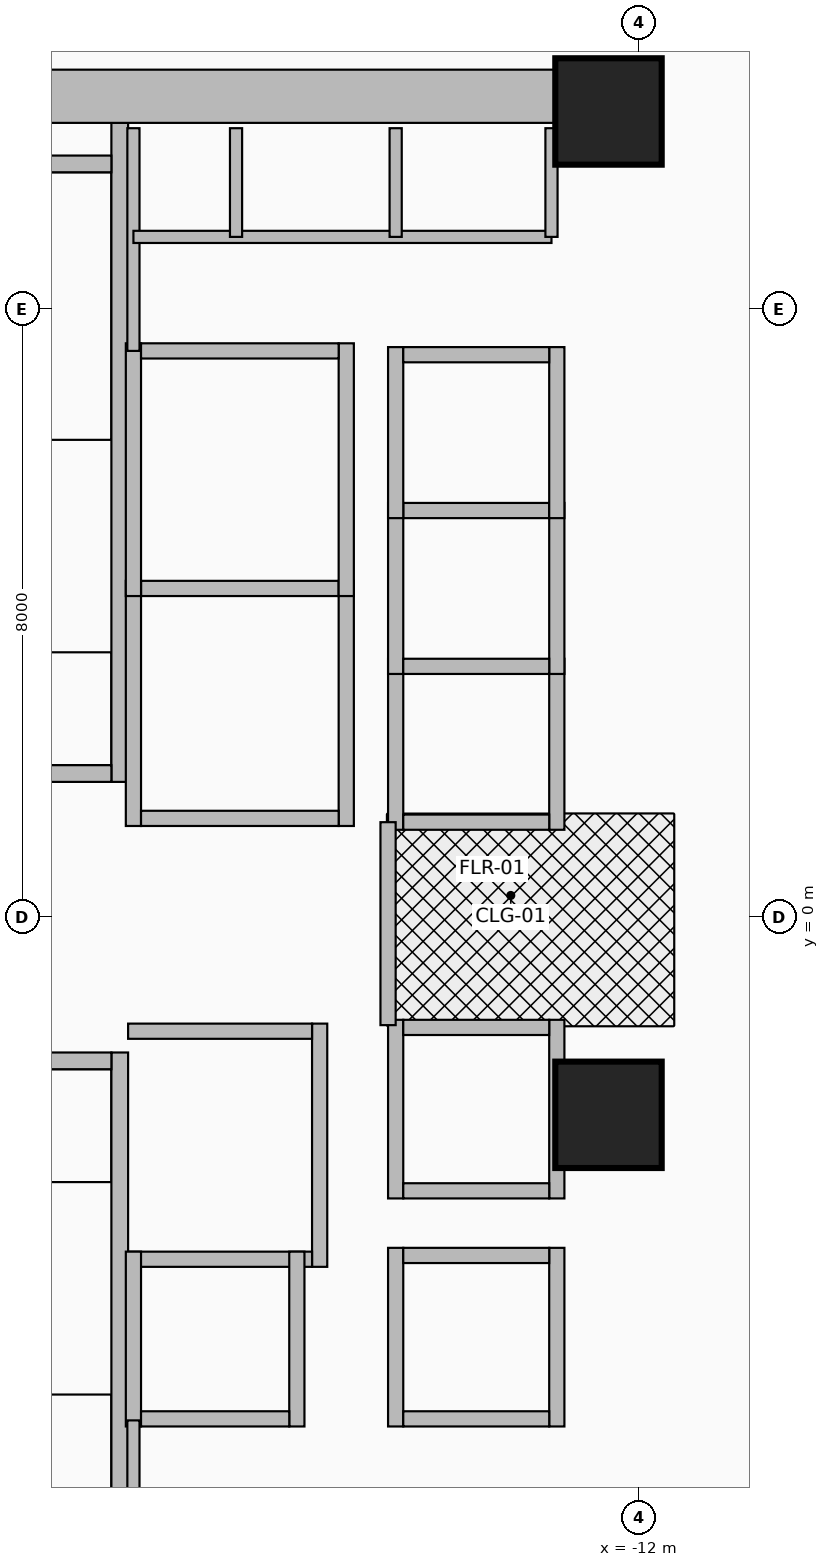
"""IFC4 building model, lengths in metres.
Left out: names, types, materials, properties, quantities, classifications, styles, units other than length and angle.
Written with IfcOpenShell. Run it as: python <this file> out.ifc"""

import sys

from ifc_helpers import new_model, si_unit, direction, frame, frame_2d, origin, origin_2d, place, context, subcontext, project, spatial, rectangle, extrude, source, transform, mapped, element, fill, save


model = new_model("IFC4")
c1 = context("Model", 3, precision=1e-05, world=origin(), true_north=direction((0.0, 1.0)))
c2 = subcontext(c1, "Body", "Model", "MODEL_VIEW")
j1 = project(units=[si_unit("LENGTHUNIT", "METRE"), si_unit("PLANEANGLEUNIT", "RADIAN")], contexts=[c1])
p1 = place(None, origin())
s1 = spatial("IfcSite", under=j1, at=p1, CompositionType="ELEMENT")
p2 = place(p1, origin())
s2 = spatial("IfcBuilding", under=s1, at=p2, CompositionType="ELEMENT")
p3 = place(p2, frame((0.0, 0.0, 70.4)))
s3 = spatial("IfcBuildingStorey", under=s2, at=p3, CompositionType="ELEMENT", Elevation=70.4)
p4 = place(p3, frame((-18.83, 1.78, 0.0), z_axis=(0.0, 0.0, 1.0), x_axis=(0.0, 1.0, 0.0)))
e1 = element("IfcWall", 1, at=p4, inside=s3, PredefinedType="SHEAR", context=c2, shape_type="SweptSolid", body=[
    extrude(rectangle(XDim=8.67, YDim=0.22, at=frame_2d((4.335, 0.0))), origin(), (0.0, 0.0, 1.0), 3.46),
])
p5 = place(p3, frame((-22.05, 1.89, 0.0), z_axis=(0.0, 0.0, 1.0), x_axis=(1.0, 0.0, 0.0)))
e2 = element("IfcWall", 2, at=p5, inside=s3, PredefinedType="SHEAR", context=c2, shape_type="SweptSolid", body=[
    extrude(rectangle(XDim=3.11, YDim=0.22, at=frame_2d((1.555, 0.0))), origin(), (0.0, 0.0, 1.0), 3.46),
])
p6 = place(p5, frame((1.0, 0.0, 0.0)))
e3 = element("IfcOpeningElement", 3, at=p6, cuts=e2, PredefinedType="OPENING", context=c2, shape_type="SweptSolid", body=[
    extrude(rectangle(XDim=1.1, YDim=2.15, at=frame_2d((0.55, 1.075))), frame((0.0, 0.125, 0.0), z_axis=(0.0, -1.0, 0.0), x_axis=(1.0, 0.0, 0.0)), (0.0, 0.0, 1.0), 0.25),
])
p7 = place(p3, frame((-22.05, 9.91, 0.0), z_axis=(0.0, 0.0, 1.0), x_axis=(1.0, 0.0, 0.0)))
e4 = element("IfcWall", 4, at=p7, inside=s3, PredefinedType="SHEAR", context=c2, shape_type="SweptSolid", body=[
    extrude(rectangle(XDim=3.11, YDim=0.22, at=frame_2d((1.555, 0.0))), origin(), (0.0, 0.0, 1.0), 3.46),
])
p8 = place(p3, frame((-18.83, -10.45, 0.0), z_axis=(0.0, 0.0, 1.0), x_axis=(0.0, 1.0, 0.0)))
e5 = element("IfcWall", 5, at=p8, inside=s3, PredefinedType="SHEAR", context=c2, shape_type="SweptSolid", body=[
    extrude(rectangle(XDim=8.67, YDim=0.22, at=frame_2d((4.335, 0.0))), origin(), (0.0, 0.0, 1.0), 3.46),
])
p9 = place(p3, frame((-22.05, -1.89, 0.0), z_axis=(0.0, 0.0, 1.0), x_axis=(1.0, 0.0, 0.0)))
e6 = element("IfcWall", 6, at=p9, inside=s3, PredefinedType="SHEAR", context=c2, shape_type="SweptSolid", body=[
    extrude(rectangle(XDim=3.11, YDim=0.22, at=frame_2d((1.555, 0.0))), origin(), (0.0, 0.0, 1.0), 3.46),
])
p10 = place(p9, frame((1.0, 0.0, 0.0)))
e7 = element("IfcOpeningElement", 7, at=p10, cuts=e6, PredefinedType="OPENING", context=c2, shape_type="SweptSolid", body=[
    extrude(rectangle(XDim=1.1, YDim=2.15, at=frame_2d((0.55, 1.075))), frame((0.0, 0.125, 0.0), z_axis=(0.0, -1.0, 0.0), x_axis=(1.0, 0.0, 0.0)), (0.0, 0.0, 1.0), 0.25),
])
p11 = place(p3, frame((-22.65, 10.8, 0.0), z_axis=(0.0, 0.0, 1.0), x_axis=(1.0, 0.0, 0.0)))
e8 = element("IfcWall", 8, at=p11, inside=s3, PredefinedType="SHEAR", context=c2, shape_type="SweptSolid", body=[
    extrude(rectangle(XDim=10.25, YDim=0.7, at=frame_2d((5.125, 0.0))), origin(), (0.0, 0.0, 1.0), 3.46),
])
m1 = source(origin(), c2, "Body", "SweptSolid", [
    extrude(rectangle(XDim=1.4, YDim=1.4, at=origin_2d()), origin(), (0.0, 0.0, 1.0), 3.7),
])
for number, where, z_axis, x_axis in (
    (9, (-12.4, -2.6, 0.0), (0.0, 0.0, 1.0), (1.0, 0.0, 0.0)),
    (10, (-12.4, 10.6, 0.0), (0.0, 0.0, 1.0), (1.0, 0.0, 0.0)),
):
    element("IfcColumn", number, at=place(p3, frame(where, z_axis=z_axis, x_axis=x_axis)), inside=s3, PredefinedType="COLUMN", context=c2, shape_type="MappedRepresentation", body=[
        mapped(m1, transform((0.0, 0.0, 0.0), x_axis=(1.0, 0.0, 0.0), y_axis=(0.0, 1.0, 0.0), z_axis=(0.0, 0.0, 1.0), scale=1.0)),
    ])
for number, where, z_axis, x_axis in (
    (11, (-18.65, 1.2, 0.0), (0.0, 0.0, 1.0), (0.0, 1.0, 0.0)),
    (12, (-15.85, 1.2, 0.0), (0.0, 0.0, 1.0), (0.0, 1.0, 0.0)),
):
    element("IfcWall", number, at=place(p3, frame(where, z_axis=z_axis, x_axis=x_axis)), inside=s3, PredefinedType="MOVABLE", context=c2, shape_type="SweptSolid", body=[
        extrude(rectangle(XDim=3.225, YDim=0.2, at=frame_2d((1.613, 0.0))), origin(), (0.0, 0.0, 1.0), 3.46),
    ])
p12 = place(p3, frame((-18.55, 1.3, 0.0), z_axis=(0.0, 0.0, 1.0), x_axis=(1.0, 0.0, 0.0)))
e13 = element("IfcWall", 13, at=p12, inside=s3, PredefinedType="MOVABLE", context=c2, shape_type="SweptSolid", body=[
    extrude(rectangle(XDim=2.6, YDim=0.2, at=frame_2d((1.3, 0.0))), origin(), (0.0, 0.0, 1.0), 3.46),
])
p13 = place(p12, frame((0.7, 0.0, 0.0)))
e14 = element("IfcOpeningElement", 14, at=p13, cuts=e13, PredefinedType="OPENING", context=c2, shape_type="SweptSolid", body=[
    extrude(rectangle(XDim=1.2, YDim=2.1, at=frame_2d((0.6, 1.05))), frame((0.0, 0.115, 0.0), z_axis=(0.0, -1.0, 0.0), x_axis=(1.0, 0.0, 0.0)), (0.0, 0.0, 1.0), 0.23),
])
p14 = place(p3, frame((-18.55, 4.325, 0.0), z_axis=(0.0, 0.0, 1.0), x_axis=(1.0, 0.0, 0.0)))
e15 = element("IfcWall", 15, at=p14, inside=s3, PredefinedType="MOVABLE", context=c2, shape_type="SweptSolid", body=[
    extrude(rectangle(XDim=2.6, YDim=0.2, at=frame_2d((1.3, 0.0))), origin(), (0.0, 0.0, 1.0), 3.46),
])
p15 = place(p3, frame((-16.2, -4.6, 0.0), z_axis=(0.0, 0.0, 1.0), x_axis=(0.0, 1.0, 0.0)))
e16 = element("IfcWall", 16, at=p15, inside=s3, PredefinedType="MOVABLE", context=c2, shape_type="SweptSolid", body=[
    extrude(rectangle(XDim=3.2, YDim=0.2, at=frame_2d((1.6, 0.0))), origin(), (0.0, 0.0, 1.0), 3.46),
])
p16 = place(p3, frame((-18.72, -4.5, 0.0), z_axis=(0.0, 0.0, 1.0), x_axis=(1.0, 0.0, 0.0)))
e17 = element("IfcWall", 17, at=p16, inside=s3, PredefinedType="MOVABLE", context=c2, shape_type="SweptSolid", body=[
    extrude(rectangle(XDim=2.42, YDim=0.2, at=frame_2d((1.21, 0.0))), origin(), (0.0, 0.0, 1.0), 3.46),
])
p17 = place(p3, frame((-18.72, -1.5, 0.0), z_axis=(0.0, 0.0, 1.0), x_axis=(1.0, 0.0, 0.0)))
e18 = element("IfcWall", 18, at=p17, inside=s3, PredefinedType="MOVABLE", context=c2, shape_type="SweptSolid", body=[
    extrude(rectangle(XDim=2.42, YDim=0.2, at=frame_2d((1.21, 0.0))), origin(), (0.0, 0.0, 1.0), 3.46),
])
p18 = place(p17, frame((0.61, 0.0, 0.0)))
e19 = element("IfcOpeningElement", 19, at=p18, cuts=e18, PredefinedType="OPENING", context=c2, shape_type="SweptSolid", body=[
    extrude(rectangle(XDim=1.2, YDim=2.1, at=frame_2d((0.6, 1.05))), frame((0.0, 0.115, 0.0), z_axis=(0.0, -1.0, 0.0), x_axis=(1.0, 0.0, 0.0)), (0.0, 0.0, 1.0), 0.23),
])
for number, where, z_axis, x_axis in (
    (20, (-18.65, 4.225, 0.0), (0.0, 0.0, 1.0), (0.0, 1.0, 0.0)),
    (21, (-15.85, 4.225, 0.0), (0.0, 0.0, 1.0), (0.0, 1.0, 0.0)),
):
    element("IfcWall", number, at=place(p3, frame(where, z_axis=z_axis, x_axis=x_axis)), inside=s3, PredefinedType="MOVABLE", context=c2, shape_type="SweptSolid", body=[
        extrude(rectangle(XDim=3.325, YDim=0.2, at=frame_2d((1.663, 0.0))), origin(), (0.0, 0.0, 1.0), 3.46),
    ])
p19 = place(p3, frame((-18.55, 7.45, 0.0), z_axis=(0.0, 0.0, 1.0), x_axis=(1.0, 0.0, 0.0)))
e22 = element("IfcWall", 22, at=p19, inside=s3, PredefinedType="MOVABLE", context=c2, shape_type="SweptSolid", body=[
    extrude(rectangle(XDim=2.6, YDim=0.2, at=frame_2d((1.3, 0.0))), origin(), (0.0, 0.0, 1.0), 3.46),
])
p20 = place(p19, frame((0.7, 0.0, 0.0)))
e23 = element("IfcOpeningElement", 23, at=p20, cuts=e22, PredefinedType="OPENING", context=c2, shape_type="SweptSolid", body=[
    extrude(rectangle(XDim=1.2, YDim=2.1, at=frame_2d((0.6, 1.05))), frame((0.0, 0.115, 0.0), z_axis=(0.0, -1.0, 0.0), x_axis=(1.0, 0.0, 0.0)), (0.0, 0.0, 1.0), 0.23),
])
for number, where, z_axis, x_axis in (
    (24, (-15.2, -6.7, 0.0), (0.0, 0.0, 1.0), (0.0, 1.0, 0.0)),
    (25, (-13.08, -6.7, 0.0), (0.0, 0.0, 1.0), (0.0, 1.0, 0.0)),
):
    element("IfcWall", number, at=place(p3, frame(where, z_axis=z_axis, x_axis=x_axis)), inside=s3, PredefinedType="MOVABLE", context=c2, shape_type="SweptSolid", body=[
        extrude(rectangle(XDim=2.35, YDim=0.2, at=frame_2d((1.175, 0.0))), origin(), (0.0, 0.0, 1.0), 3.46),
    ])
p21 = place(p3, frame((-15.1, -6.6, 0.0), z_axis=(0.0, 0.0, 1.0), x_axis=(1.0, 0.0, 0.0)))
e26 = element("IfcWall", 26, at=p21, inside=s3, PredefinedType="MOVABLE", context=c2, shape_type="SweptSolid", body=[
    extrude(rectangle(XDim=1.92, YDim=0.2, at=frame_2d((0.96, 0.0))), origin(), (0.0, 0.0, 1.0), 3.46),
])
p22 = place(p21, frame((0.41, 0.0, 0.0)))
e27 = element("IfcOpeningElement", 27, at=p22, cuts=e26, PredefinedType="OPENING", context=c2, shape_type="SweptSolid", body=[
    extrude(rectangle(XDim=1.1, YDim=2.1, at=frame_2d((0.55, 1.05))), frame((0.0, 0.115, 0.0), z_axis=(0.0, -1.0, 0.0), x_axis=(1.0, 0.0, 0.0)), (0.0, 0.0, 1.0), 0.23),
])
p23 = place(p3, frame((-15.1, -4.45, 0.0), z_axis=(0.0, 0.0, 1.0), x_axis=(1.0, 0.0, 0.0)))
e28 = element("IfcWall", 28, at=p23, inside=s3, PredefinedType="MOVABLE", context=c2, shape_type="SweptSolid", body=[
    extrude(rectangle(XDim=1.92, YDim=0.2, at=frame_2d((0.96, 0.0))), origin(), (0.0, 0.0, 1.0), 3.46),
])
for number, where, z_axis, x_axis in (
    (29, (-15.2, 1.15, 0.0), (0.0, 0.0, 1.0), (0.0, 1.0, 0.0)),
    (30, (-13.08, 1.15, 0.0), (0.0, 0.0, 1.0), (0.0, 1.0, 0.0)),
):
    element("IfcWall", number, at=place(p3, frame(where, z_axis=z_axis, x_axis=x_axis)), inside=s3, PredefinedType="MOVABLE", context=c2, shape_type="SweptSolid", body=[
        extrude(rectangle(XDim=2.25, YDim=0.2, at=frame_2d((1.125, 0.0))), origin(), (0.0, 0.0, 1.0), 3.46),
    ])
p24 = place(p3, frame((-15.1, 1.25, 0.0), z_axis=(0.0, 0.0, 1.0), x_axis=(1.0, 0.0, 0.0)))
e31 = element("IfcWall", 31, at=p24, inside=s3, PredefinedType="MOVABLE", context=c2, shape_type="SweptSolid", body=[
    extrude(rectangle(XDim=1.92, YDim=0.2, at=frame_2d((0.96, 0.0))), origin(), (0.0, 0.0, 1.0), 3.46),
])
for number, where, z_axis, x_axis in (
    (32, (-15.2, 3.2, 0.0), (0.0, 0.0, 1.0), (0.0, 1.0, 0.0)),
    (33, (-13.08, 3.2, 0.0), (0.0, 0.0, 1.0), (0.0, 1.0, 0.0)),
):
    element("IfcWall", number, at=place(p3, frame(where, z_axis=z_axis, x_axis=x_axis)), inside=s3, PredefinedType="MOVABLE", context=c2, shape_type="SweptSolid", body=[
        extrude(rectangle(XDim=2.25, YDim=0.2, at=frame_2d((1.125, 0.0))), origin(), (0.0, 0.0, 1.0), 3.46),
    ])
for number, where, z_axis, x_axis in (
    (34, (-15.1, 3.3, 0.0), (0.0, 0.0, 1.0), (1.0, 0.0, 0.0)),
    (35, (-15.1, 5.35, 0.0), (0.0, 0.0, 1.0), (1.0, 0.0, 0.0)),
):
    element("IfcWall", number, at=place(p3, frame(where, z_axis=z_axis, x_axis=x_axis)), inside=s3, PredefinedType="MOVABLE", context=c2, shape_type="SweptSolid", body=[
        extrude(rectangle(XDim=1.92, YDim=0.2, at=frame_2d((0.96, 0.0))), origin(), (0.0, 0.0, 1.0), 3.46),
    ])
for number, where, z_axis, x_axis in (
    (36, (-15.2, 5.25, 0.0), (0.0, 0.0, 1.0), (0.0, 1.0, 0.0)),
    (37, (-13.08, 5.25, 0.0), (0.0, 0.0, 1.0), (0.0, 1.0, 0.0)),
):
    element("IfcWall", number, at=place(p3, frame(where, z_axis=z_axis, x_axis=x_axis)), inside=s3, PredefinedType="MOVABLE", context=c2, shape_type="SweptSolid", body=[
        extrude(rectangle(XDim=2.25, YDim=0.2, at=frame_2d((1.125, 0.0))), origin(), (0.0, 0.0, 1.0), 3.46),
    ])
p25 = place(p3, frame((-15.1, 7.4, 0.0), z_axis=(0.0, 0.0, 1.0), x_axis=(1.0, 0.0, 0.0)))
e38 = element("IfcWall", 38, at=p25, inside=s3, PredefinedType="MOVABLE", context=c2, shape_type="SweptSolid", body=[
    extrude(rectangle(XDim=1.92, YDim=0.2, at=frame_2d((0.96, 0.0))), origin(), (0.0, 0.0, 1.0), 3.46),
])
for number, where, z_axis, x_axis in (
    (39, (-18.65, -6.7, 0.0), (0.0, 0.0, 1.0), (0.0, 1.0, 0.0)),
    (40, (-16.5, -6.7, 0.0), (0.0, 0.0, 1.0), (0.0, 1.0, 0.0)),
):
    element("IfcWall", number, at=place(p3, frame(where, z_axis=z_axis, x_axis=x_axis)), inside=s3, PredefinedType="MOVABLE", context=c2, shape_type="SweptSolid", body=[
        extrude(rectangle(XDim=2.3, YDim=0.2, at=frame_2d((1.15, 0.0))), origin(), (0.0, 0.0, 1.0), 3.46),
    ])
p26 = place(p3, frame((-18.55, -6.6, 0.0), z_axis=(0.0, 0.0, 1.0), x_axis=(1.0, 0.0, 0.0)))
e41 = element("IfcWall", 41, at=p26, inside=s3, PredefinedType="MOVABLE", context=c2, shape_type="SweptSolid", body=[
    extrude(rectangle(XDim=1.95, YDim=0.2, at=frame_2d((0.975, 0.0))), origin(), (0.0, 0.0, 1.0), 3.46),
])
for number, where, z_axis, x_axis in (
    (42, (-15.2, -3.7, 0.0), (0.0, 0.0, 1.0), (0.0, 1.0, 0.0)),
    (43, (-13.08, -3.7, 0.0), (0.0, 0.0, 1.0), (0.0, 1.0, 0.0)),
):
    element("IfcWall", number, at=place(p3, frame(where, z_axis=z_axis, x_axis=x_axis)), inside=s3, PredefinedType="MOVABLE", context=c2, shape_type="SweptSolid", body=[
        extrude(rectangle(XDim=2.35, YDim=0.2, at=frame_2d((1.175, 0.0))), origin(), (0.0, 0.0, 1.0), 3.46),
    ])
for number, where, z_axis, x_axis in (
    (44, (-15.1, -3.6, 0.0), (0.0, 0.0, 1.0), (1.0, 0.0, 0.0)),
    (45, (-15.1, -1.45, 0.0), (0.0, 0.0, 1.0), (1.0, 0.0, 0.0)),
):
    element("IfcWall", number, at=place(p3, frame(where, z_axis=z_axis, x_axis=x_axis)), inside=s3, PredefinedType="MOVABLE", context=c2, shape_type="SweptSolid", body=[
        extrude(rectangle(XDim=1.92, YDim=0.2, at=frame_2d((0.96, 0.0))), origin(), (0.0, 0.0, 1.0), 3.46),
    ])
p27 = place(p3, frame((-15.3, -1.42, 0.0), z_axis=(0.0, 0.0, 1.0), x_axis=(0.0, 1.0, 0.0)))
e46 = element("IfcWall", 46, at=p27, inside=s3, PredefinedType="PARTITIONING", context=c2, shape_type="SweptSolid", body=[
    extrude(rectangle(XDim=2.67, YDim=0.2, at=frame_2d((1.335, 0.0))), origin(), (0.0, 0.0, 1.0), 3.46),
])
p28 = place(p27, frame((0.78, 0.0, 0.0)))
e47 = element("IfcOpeningElement", 47, at=p28, cuts=e46, PredefinedType="OPENING", context=c2, shape_type="SweptSolid", body=[
    extrude(rectangle(XDim=1.05, YDim=2.15, at=frame_2d((0.525, 1.075))), frame((0.0, 0.115, 0.0), z_axis=(0.0, -1.0, 0.0), x_axis=(1.0, 0.0, 0.0)), (0.0, 0.0, 1.0), 0.23),
])
p29 = place(p3, frame((-18.65, 7.45, 0.0), z_axis=(0.0, 0.0, 1.0), x_axis=(0.0, 1.0, 0.0)))
e48 = element("IfcWall", 48, at=p29, inside=s3, PredefinedType="PARTITIONING", context=c2, shape_type="SweptSolid", body=[
    extrude(rectangle(XDim=2.93, YDim=0.16, at=frame_2d((1.465, 0.0))), origin(), (0.0, 0.0, 1.0), 3.46),
])
p30 = place(p3, frame((-18.65, -8.18, 0.0), z_axis=(0.0, 0.0, 1.0), x_axis=(0.0, 1.0, 0.0)))
e49 = element("IfcWall", 49, at=p30, inside=s3, PredefinedType="PARTITIONING", context=c2, shape_type="SweptSolid", body=[
    extrude(rectangle(XDim=1.56, YDim=0.16, at=frame_2d((0.78, 0.0))), origin(), (0.0, 0.0, 1.0), 3.46),
])
p31 = place(p3, frame((-18.65, 8.95, 0.0), z_axis=(0.0, 0.0, 1.0), x_axis=(1.0, 0.0, 0.0)))
e50 = element("IfcWall", 50, at=p31, inside=s3, PredefinedType="PARTITIONING", context=c2, shape_type="SweptSolid", body=[
    extrude(rectangle(XDim=5.5, YDim=0.16, at=frame_2d((2.75, 0.0))), origin(), (0.0, 0.0, 1.0), 3.46),
])
p32 = place(p31, frame((0.3, 0.0, 0.0)))
e51 = element("IfcOpeningElement", 51, at=p32, cuts=e50, PredefinedType="OPENING", context=c2, shape_type="SweptSolid", body=[
    extrude(rectangle(XDim=0.85, YDim=2.05, at=frame_2d((0.425, 1.025))), frame((0.0, 0.095, 0.0), z_axis=(0.0, -1.0, 0.0), x_axis=(1.0, 0.0, 0.0)), (0.0, 0.0, 1.0), 0.19),
])
p33 = place(p31, frame((1.85, 0.0, 0.0)))
e52 = element("IfcOpeningElement", 52, at=p33, cuts=e50, PredefinedType="OPENING", context=c2, shape_type="SweptSolid", body=[
    extrude(rectangle(XDim=0.85, YDim=2.05, at=frame_2d((0.425, 1.025))), frame((0.0, 0.095, 0.0), z_axis=(0.0, -1.0, 0.0), x_axis=(1.0, 0.0, 0.0)), (0.0, 0.0, 1.0), 0.19),
])
p34 = place(p31, frame((3.9, 0.0, 0.0)))
e53 = element("IfcOpeningElement", 53, at=p34, cuts=e50, PredefinedType="OPENING", context=c2, shape_type="SweptSolid", body=[
    extrude(rectangle(XDim=0.85, YDim=2.05, at=frame_2d((0.425, 1.025))), frame((0.0, 0.095, 0.0), z_axis=(0.0, -1.0, 0.0), x_axis=(1.0, 0.0, 0.0)), (0.0, 0.0, 1.0), 0.19),
])
for number, where, z_axis, x_axis in (
    (54, (-13.15, 8.95, 0.0), (0.0, 0.0, 1.0), (0.0, 1.0, 0.0)),
    (55, (-17.3, 8.95, 0.0), (0.0, 0.0, 1.0), (0.0, 1.0, 0.0)),
    (56, (-15.2, 8.95, 0.0), (0.0, 0.0, 1.0), (0.0, 1.0, 0.0)),
):
    element("IfcWall", number, at=place(p3, frame(where, z_axis=z_axis, x_axis=x_axis)), inside=s3, PredefinedType="PARTITIONING", context=c2, shape_type="SweptSolid", body=[
        extrude(rectangle(XDim=1.43, YDim=0.16, at=frame_2d((0.715, 0.0))), origin(), (0.0, 0.0, 1.0), 3.46),
    ])
p35 = place(p13, origin())
e57 = element("IfcDoor", 57, at=p35, inside=s3, OperationType="DOUBLE_DOOR_SLIDING", PredefinedType="DOOR", context=c2, shape_type="SweptSolid", body=[
    extrude(rectangle(XDim=1.2, YDim=2.1, at=frame_2d((0.6, 1.05))), frame((0.0, 0.025, 0.0), z_axis=(0.0, -1.0, 0.0), x_axis=(1.0, 0.0, 0.0)), (0.0, 0.0, 1.0), 0.05),
])
fill(e14, e57)
p36 = place(p18, origin())
e58 = element("IfcDoor", 58, at=p36, inside=s3, OperationType="DOUBLE_DOOR_SLIDING", PredefinedType="DOOR", context=c2, shape_type="SweptSolid", body=[
    extrude(rectangle(XDim=1.2, YDim=2.1, at=frame_2d((0.6, 1.05))), frame((0.0, 0.025, 0.0), z_axis=(0.0, -1.0, 0.0), x_axis=(1.0, 0.0, 0.0)), (0.0, 0.0, 1.0), 0.05),
])
fill(e19, e58)
p37 = place(p20, origin())
e59 = element("IfcDoor", 59, at=p37, inside=s3, OperationType="DOUBLE_DOOR_SLIDING", PredefinedType="DOOR", context=c2, shape_type="SweptSolid", body=[
    extrude(rectangle(XDim=1.2, YDim=2.1, at=frame_2d((0.6, 1.05))), frame((0.0, 0.025, 0.0), z_axis=(0.0, -1.0, 0.0), x_axis=(1.0, 0.0, 0.0)), (0.0, 0.0, 1.0), 0.05),
])
fill(e23, e59)
p38 = place(p22, origin())
e60 = element("IfcDoor", 60, at=p38, inside=s3, OperationType="DOUBLE_DOOR_SLIDING", PredefinedType="DOOR", context=c2, shape_type="SweptSolid", body=[
    extrude(rectangle(XDim=1.1, YDim=2.1, at=frame_2d((0.55, 1.05))), frame((0.0, 0.025, 0.0), z_axis=(0.0, -1.0, 0.0), x_axis=(1.0, 0.0, 0.0)), (0.0, 0.0, 1.0), 0.05),
])
fill(e27, e60)
p39 = place(p28, origin())
e61 = element("IfcDoor", 61, at=p39, inside=s3, OperationType="SINGLE_SWING_RIGHT", PredefinedType="DOOR", context=c2, shape_type="SweptSolid", body=[
    extrude(rectangle(XDim=1.05, YDim=2.15, at=frame_2d((0.525, 1.075))), frame((0.0, 0.025, 0.0), z_axis=(0.0, -1.0, 0.0), x_axis=(1.0, 0.0, 0.0)), (0.0, 0.0, 1.0), 0.05),
])
fill(e47, e61)
p40 = place(p32, origin())
e62 = element("IfcDoor", 62, at=p40, inside=s3, OperationType="SINGLE_SWING_LEFT", PredefinedType="DOOR", context=c2, shape_type="SweptSolid", body=[
    extrude(rectangle(XDim=0.85, YDim=2.05, at=frame_2d((0.425, 1.025))), frame((0.0, 0.025, 0.0), z_axis=(0.0, -1.0, 0.0), x_axis=(1.0, 0.0, 0.0)), (0.0, 0.0, 1.0), 0.05),
])
fill(e51, e62)
p41 = place(p33, origin())
e63 = element("IfcDoor", 63, at=p41, inside=s3, OperationType="SINGLE_SWING_RIGHT", PredefinedType="DOOR", context=c2, shape_type="SweptSolid", body=[
    extrude(rectangle(XDim=0.85, YDim=2.05, at=frame_2d((0.425, 1.025))), frame((0.0, 0.025, 0.0), z_axis=(0.0, -1.0, 0.0), x_axis=(1.0, 0.0, 0.0)), (0.0, 0.0, 1.0), 0.05),
])
fill(e52, e63)
p42 = place(p34, origin())
e64 = element("IfcDoor", 64, at=p42, inside=s3, OperationType="SINGLE_SWING_LEFT", PredefinedType="DOOR", context=c2, shape_type="SweptSolid", body=[
    extrude(rectangle(XDim=0.85, YDim=2.05, at=frame_2d((0.425, 1.025))), frame((0.0, 0.025, 0.0), z_axis=(0.0, -1.0, 0.0), x_axis=(1.0, 0.0, 0.0)), (0.0, 0.0, 1.0), 0.05),
])
fill(e53, e64)
save(model, sys.argv[1])
